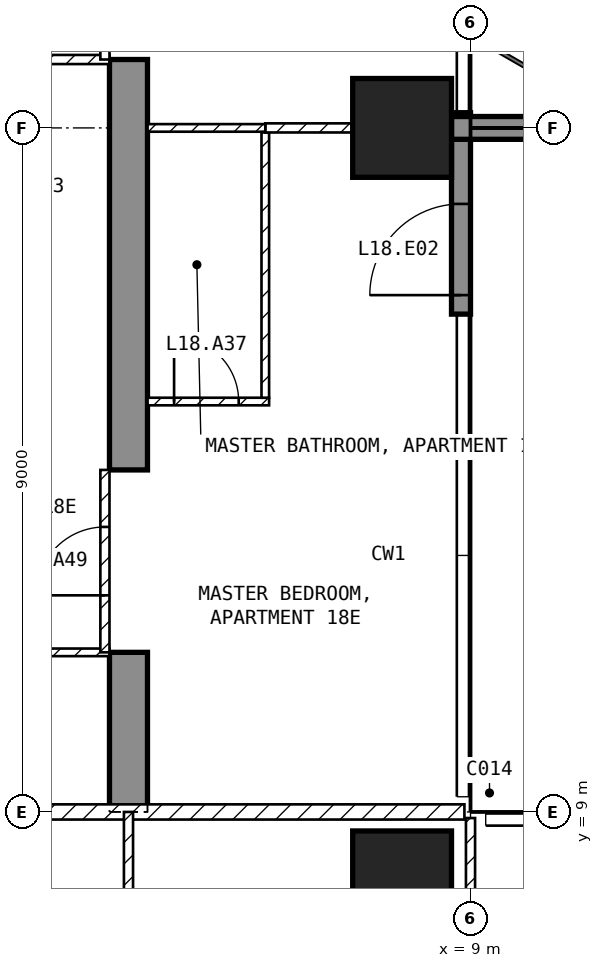
"""IFC4 building model, lengths in metres.
Left out: names, types, materials, properties, quantities, classifications, styles, units other than length and angle.
Written with IfcOpenShell. Run it as: python <this file> out.ifc"""

import sys

from ifc_helpers import new_model, si_unit, direction, frame, frame_2d, origin, origin_2d, place, context, subcontext, project, spatial, polyline, rectangle, outline, extrude, element, fill, save


model = new_model("IFC4")
c1 = context("Model", 3, precision=1e-05, world=origin(), true_north=direction((0.0, 1.0)))
c2 = subcontext(c1, "Body", "Model", "MODEL_VIEW")
j1 = project(units=[si_unit("LENGTHUNIT", "METRE"), si_unit("PLANEANGLEUNIT", "RADIAN")], contexts=[c1])
p1 = place(None, origin())
s1 = spatial("IfcSite", under=j1, at=p1, CompositionType="ELEMENT")
p2 = place(p1, origin())
s2 = spatial("IfcBuilding", under=s1, at=p2, CompositionType="ELEMENT")
p3 = place(p2, frame((0.0, 0.0, 82.0)))
s3 = spatial("IfcBuildingStorey", under=s2, at=p3, CompositionType="ELEMENT", Elevation=82.0)
for number, where, z_axis, x_axis in (
    (1, (8.1, 8.1, -0.25), (0.0, 0.0, 1.0), (1.0, 0.0, 0.0)),
    (2, (8.1, 18.0, -0.25), (0.0, 0.0, 1.0), (1.0, 0.0, 0.0)),
):
    element("IfcColumn", number, at=place(p3, frame(where, z_axis=z_axis, x_axis=x_axis)), inside=s3, PredefinedType="COLUMN", context=c2, shape_type="SweptSolid", body=[
        extrude(rectangle(XDim=1.3, YDim=1.3, at=origin_2d()), origin(), (0.0, 0.0, 1.0), 3.5),
    ])
p4 = place(p3, frame((4.25, 9.0, -0.25), z_axis=(1.0, 0.0, 0.0), x_axis=(0.0, 1.0, 0.0)))
e3 = element("IfcWall", 3, at=p4, inside=s3, PredefinedType="SHEAR", context=c2, shape_type="SweptSolid", body=[
    extrude(outline(polyline([(0.0, 0.0), (2.1, 0.0), (2.1, 2.65), (4.5, 2.65), (4.5, 0.0), (9.9, 0.0), (9.9, 2.65), (12.3, 2.65), (12.3, 0.0), (16.45, 0.0), (16.45, 3.5), (0.0, 3.5), (0.0, 0.0)])), origin(), (0.0, 0.0, 1.0), 0.5),
])
p5 = place(p3, frame((8.875, 15.55, 0.0), z_axis=(0.0, 0.0, 1.0), x_axis=(0.0, 1.0, 0.0)))
e4 = element("IfcWall", 4, at=p5, inside=s3, PredefinedType="SOLIDWALL", context=c2, shape_type="SweptSolid", body=[
    extrude(rectangle(XDim=2.65, YDim=0.25, at=frame_2d((1.325, 0.0))), origin(), (0.0, 0.0, 1.0), 3.25),
])
p6 = place(p5, frame((0.25, 0.0, 0.0)))
e5 = element("IfcOpeningElement", 5, at=p6, cuts=e4, PredefinedType="OPENING", context=c2, shape_type="SweptSolid", body=[
    extrude(rectangle(XDim=1.2, YDim=2.4, at=frame_2d((0.6, 1.2))), frame((0.0, 0.135, 0.0), z_axis=(0.0, -1.0, 0.0), x_axis=(1.0, 0.0, 0.0)), (0.0, 0.0, 1.0), 0.27),
])
p7 = place(p3, frame((8.75, 18.0, 0.0), z_axis=(0.0, 0.0, 1.0), x_axis=(1.0, 0.0, 0.0)))
e6 = element("IfcWall", 6, at=p7, inside=s3, PredefinedType="SOLIDWALL", context=c2, shape_type="SweptSolid", body=[
    extrude(rectangle(XDim=2.95, YDim=0.3, at=frame_2d((1.475, 0.0))), origin(), (0.0, 0.0, 1.0), 3.25),
])
p8 = place(p3, frame((-8.92, 9.0, 0.0), z_axis=(0.0, 0.0, 1.0), x_axis=(1.0, 0.0, 0.0)))
e7 = element("IfcWall", 7, at=p8, inside=s3, PredefinedType="PARTITIONING", context=c2, shape_type="SweptSolid", body=[
    extrude(rectangle(XDim=17.84, YDim=0.2, at=frame_2d((8.92, 0.0))), origin(), (0.0, 0.0, 1.0), 3.25),
])
p9 = place(p8, frame((8.42, 0.0, 0.0)))
e8 = element("IfcOpeningElement", 8, at=p9, cuts=e7, PredefinedType="OPENING", context=c2, shape_type="SweptSolid", body=[
    extrude(rectangle(XDim=1.0, YDim=2.1, at=frame_2d((0.5, 1.05))), frame((0.0, 0.11, 0.0), z_axis=(0.0, -1.0, 0.0), x_axis=(1.0, 0.0, 0.0)), (0.0, 0.0, 1.0), 0.22),
])
p10 = place(p3, frame((9.0, 1.3, 0.0), z_axis=(0.0, 0.0, 1.0), x_axis=(0.0, 1.0, 0.0)))
e9 = element("IfcWall", 9, at=p10, inside=s3, PredefinedType="PARTITIONING", context=c2, shape_type="SweptSolid", body=[
    extrude(rectangle(XDim=7.62, YDim=0.12, at=frame_2d((3.81, 0.0))), origin(), (0.0, 0.0, 1.0), 3.25),
])
p11 = place(p10, frame((4.05, 0.0, 0.0)))
e10 = element("IfcOpeningElement", 10, at=p11, cuts=e9, PredefinedType="OPENING", context=c2, shape_type="SweptSolid", body=[
    extrude(rectangle(XDim=0.9, YDim=2.1, at=frame_2d((0.45, 1.05))), frame((0.0, 0.07, 0.0), z_axis=(0.0, -1.0, 0.0), x_axis=(1.0, 0.0, 0.0)), (0.0, 0.0, 1.0), 0.14),
])
p12 = place(p3, frame((4.5, 1.3, 0.0), z_axis=(0.0, 0.0, 1.0), x_axis=(0.0, 1.0, 0.0)))
e11 = element("IfcWall", 11, at=p12, inside=s3, PredefinedType="PARTITIONING", context=c2, shape_type="SweptSolid", body=[
    extrude(rectangle(XDim=7.7, YDim=0.12, at=frame_2d((3.85, 0.0))), origin(), (0.0, 0.0, 1.0), 3.25),
])
p13 = place(p12, frame((3.4, 0.0, 0.0)))
e12 = element("IfcOpeningElement", 12, at=p13, cuts=e11, PredefinedType="OPENING", context=c2, shape_type="SweptSolid", body=[
    extrude(rectangle(XDim=0.9, YDim=2.1, at=frame_2d((0.45, 1.05))), frame((0.0, 0.07, 0.0), z_axis=(0.0, -1.0, 0.0), x_axis=(1.0, 0.0, 0.0)), (0.0, 0.0, 1.0), 0.14),
])
p14 = place(p3, frame((2.1, 11.1, 0.0), z_axis=(0.0, 0.0, 1.0), x_axis=(1.0, 0.0, 0.0)))
e13 = element("IfcWall", 13, at=p14, inside=s3, PredefinedType="PARTITIONING", context=c2, shape_type="SweptSolid", body=[
    extrude(rectangle(XDim=2.15, YDim=0.1, at=frame_2d((1.075, 0.0))), origin(), (0.0, 0.0, 1.0), 3.25),
])
p15 = place(p3, frame((-4.25, 18.9, 0.0), z_axis=(0.0, 0.0, 1.0), x_axis=(1.0, 0.0, 0.0)))
e14 = element("IfcWall", 14, at=p15, inside=s3, PredefinedType="PARTITIONING", context=c2, shape_type="SweptSolid", body=[
    extrude(rectangle(XDim=8.5, YDim=0.12, at=frame_2d((4.25, 0.0))), origin(), (0.0, 0.0, 1.0), 3.25),
])
p16 = place(p15, frame((1.925, 0.0, 0.0)))
e15 = element("IfcOpeningElement", 15, at=p16, cuts=e14, PredefinedType="OPENING", context=c2, shape_type="SweptSolid", body=[
    extrude(rectangle(XDim=0.9, YDim=2.1, at=frame_2d((0.45, 1.05))), frame((0.0, 0.07, 0.0), z_axis=(0.0, -1.0, 0.0), x_axis=(1.0, 0.0, 0.0)), (0.0, 0.0, 1.0), 0.14),
])
p17 = place(p3, frame((4.75, 14.4, 0.0), z_axis=(0.0, 0.0, 1.0), x_axis=(1.0, 0.0, 0.0)))
e16 = element("IfcWall", 16, at=p17, inside=s3, PredefinedType="PARTITIONING", context=c2, shape_type="SweptSolid", body=[
    extrude(rectangle(XDim=1.6, YDim=0.1, at=frame_2d((0.8, 0.0))), origin(), (0.0, 0.0, 1.0), 3.25),
])
p18 = place(p17, frame((0.35, 0.0, 0.0)))
e17 = element("IfcOpeningElement", 17, at=p18, cuts=e16, PredefinedType="OPENING", context=c2, shape_type="SweptSolid", body=[
    extrude(rectangle(XDim=0.85, YDim=2.1, at=frame_2d((0.425, 1.05))), frame((0.0, 0.06, 0.0), z_axis=(0.0, -1.0, 0.0), x_axis=(1.0, 0.0, 0.0)), (0.0, 0.0, 1.0), 0.12),
])
p19 = place(p3, frame((6.3, 14.45, 0.0), z_axis=(0.0, 0.0, 1.0), x_axis=(0.0, 1.0, 0.0)))
e18 = element("IfcWall", 18, at=p19, inside=s3, PredefinedType="PARTITIONING", context=c2, shape_type="SweptSolid", body=[
    extrude(rectangle(XDim=3.49, YDim=0.1, at=frame_2d((1.745, 0.0))), origin(), (0.0, 0.0, 1.0), 3.25),
])
p20 = place(p3, frame((6.3, 18.0, 0.0), z_axis=(0.0, 0.0, 1.0), x_axis=(1.0, 0.0, 0.0)))
e19 = element("IfcWall", 19, at=p20, inside=s3, PredefinedType="PARTITIONING", context=c2, shape_type="SweptSolid", body=[
    extrude(rectangle(XDim=1.15, YDim=0.12, at=frame_2d((0.575, 0.0))), origin(), (0.0, 0.0, 1.0), 2.346),
])
p21 = place(p3, frame((4.75, 18.0, 0.0), z_axis=(0.0, 0.0, 1.0), x_axis=(1.0, 0.0, 0.0)))
e20 = element("IfcWall", 20, at=p21, inside=s3, PredefinedType="PARTITIONING", context=c2, shape_type="SweptSolid", body=[
    extrude(rectangle(XDim=1.55, YDim=0.1, at=frame_2d((0.775, 0.0))), origin(), (0.0, 0.0, 1.0), 2.346),
])
p22 = place(p3, frame((4.19, 11.1, 0.0), z_axis=(0.0, 0.0, 1.0), x_axis=(0.0, 1.0, 0.0)))
e21 = element("IfcWall", 21, at=p22, inside=s3, PredefinedType="PARTITIONING", context=c2, shape_type="SweptSolid", body=[
    extrude(rectangle(XDim=2.4, YDim=0.12, at=frame_2d((1.2, 0.0))), origin(), (0.0, 0.0, 1.0), 2.4),
])
p23 = place(p22, frame((0.75, 0.0, 0.0)))
e22 = element("IfcOpeningElement", 22, at=p23, cuts=e21, PredefinedType="OPENING", context=c2, shape_type="SweptSolid", body=[
    extrude(rectangle(XDim=0.9, YDim=2.1, at=frame_2d((0.45, 1.05))), frame((0.0, 0.07, 0.0), z_axis=(0.0, -1.0, 0.0), x_axis=(1.0, 0.0, 0.0)), (0.0, 0.0, 1.0), 0.14),
])
p24 = place(p3, frame((4.19, 18.9, 0.0), z_axis=(0.0, 0.0, 1.0), x_axis=(0.0, 1.0, 0.0)))
e23 = element("IfcWall", 23, at=p24, inside=s3, PredefinedType="PARTITIONING", context=c2, shape_type="SweptSolid", body=[
    extrude(rectangle(XDim=2.4, YDim=0.12, at=frame_2d((1.2, 0.0))), origin(), (0.0, 0.0, 1.0), 2.4),
])
p25 = place(p24, frame((0.75, 0.0, 0.0)))
e24 = element("IfcOpeningElement", 24, at=p25, cuts=e23, PredefinedType="OPENING", context=c2, shape_type="SweptSolid", body=[
    extrude(rectangle(XDim=0.9, YDim=2.1, at=frame_2d((0.45, 1.05))), frame((0.0, 0.07, 0.0), z_axis=(0.0, -1.0, 0.0), x_axis=(1.0, 0.0, 0.0)), (0.0, 0.0, 1.0), 0.14),
])
p26 = place(p6, origin())
e25 = element("IfcDoor", 25, at=p26, inside=s3, OperationType="SINGLE_SWING_LEFT", PredefinedType="DOOR", context=c2, shape_type="SweptSolid", body=[
    extrude(rectangle(XDim=1.2, YDim=2.4, at=frame_2d((0.6, 1.2))), frame((0.0, 0.025, 0.0), z_axis=(0.0, -1.0, 0.0), x_axis=(1.0, 0.0, 0.0)), (0.0, 0.0, 1.0), 0.05),
])
fill(e5, e25)
p27 = place(p18, origin())
e26 = element("IfcDoor", 26, at=p27, inside=s3, OperationType="SINGLE_SWING_LEFT", PredefinedType="DOOR", context=c2, shape_type="SweptSolid", body=[
    extrude(rectangle(XDim=0.85, YDim=2.1, at=frame_2d((0.425, 1.05))), frame((0.0, 0.025, 0.0), z_axis=(0.0, -1.0, 0.0), x_axis=(1.0, 0.0, 0.0)), (0.0, 0.0, 1.0), 0.05),
])
fill(e17, e26)
p28 = place(p23, origin())
e27 = element("IfcDoor", 27, at=p28, inside=s3, OperationType="SINGLE_SWING_LEFT", PredefinedType="DOOR", context=c2, shape_type="SweptSolid", body=[
    extrude(rectangle(XDim=0.9, YDim=2.1, at=frame_2d((0.45, 1.05))), frame((0.0, 0.025, 0.0), z_axis=(0.0, -1.0, 0.0), x_axis=(1.0, 0.0, 0.0)), (0.0, 0.0, 1.0), 0.05),
])
fill(e22, e27)
save(model, sys.argv[1])
